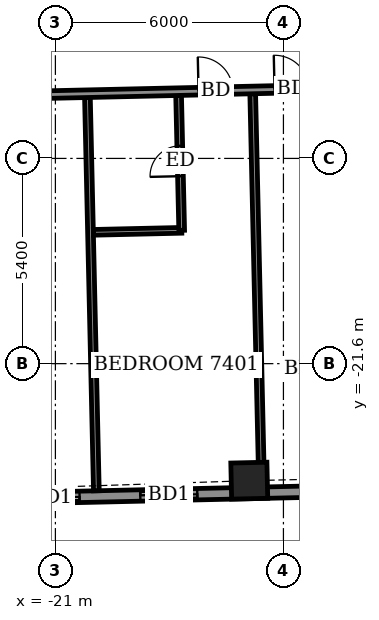
"""IFC4 building model, lengths in metres.
Left out: names, types, materials, properties, quantities, classifications, styles, units other than length and angle.
Written with IfcOpenShell. Run it as: python <this file> out.ifc"""

import sys

from ifc_helpers import new_model, si_unit, direction, frame, frame_2d, origin, origin_2d, place, context, subcontext, project, spatial, rectangle, extrude, element, fill, save


model = new_model("IFC4")
c1 = context("Model", 3, precision=1e-05, world=origin(), true_north=direction((0.0, 1.0)))
c2 = subcontext(c1, "Body", "Model", "MODEL_VIEW")
j1 = project(units=[si_unit("LENGTHUNIT", "METRE"), si_unit("PLANEANGLEUNIT", "RADIAN")], contexts=[c1])
p1 = place(None, origin())
s1 = spatial("IfcSite", under=j1, at=p1, CompositionType="ELEMENT")
p2 = place(p1, origin())
s2 = spatial("IfcBuilding", under=s1, at=p2, CompositionType="ELEMENT")
p3 = place(p2, frame((0.0, 0.0, 290.7)))
s3 = spatial("IfcBuildingStorey", under=s2, at=p3, CompositionType="ELEMENT", Elevation=290.7)
p4 = place(p3, frame((-15.899, -24.679, -0.55), z_axis=(0.0, 0.0, 1.0), x_axis=(0.999742783124, 0.022679673549, 0.0)))
e1 = element("IfcColumn", 1, at=p4, inside=s3, PredefinedType="COLUMN", context=c2, shape_type="SweptSolid", body=[
    extrude(rectangle(XDim=0.95, YDim=0.95, at=origin_2d()), origin(), (0.0, 0.0, 1.0), 3.6),
])
p5 = place(p3, frame((-22.816, -25.161, 0.0), z_axis=(0.0, 0.0, 1.0), x_axis=(0.999742646411, 0.022685699159, 0.0)))
e2 = element("IfcWall", 2, at=p5, inside=s3, PredefinedType="SOLIDWALL", context=c2, shape_type="SweptSolid", body=[
    extrude(rectangle(XDim=49.236, YDim=0.3, at=frame_2d((24.618, 0.0))), origin(), (0.0, 0.0, 1.0), 2.5),
])
p6 = place(p5, frame((0.953, 0.0, 0.0)))
e3 = element("IfcOpeningElement", 3, at=p6, cuts=e2, PredefinedType="OPENING", context=c2, shape_type="SweptSolid", body=[
    extrude(rectangle(XDim=1.5, YDim=2.4, at=frame_2d((0.75, 1.2))), frame((0.0, 0.16, 0.0), z_axis=(0.0, -1.0, 0.0), x_axis=(1.0, 0.0, 0.0)), (0.0, 0.0, 1.0), 0.32),
])
p7 = place(p5, frame((4.051, 0.0, 0.0)))
e4 = element("IfcOpeningElement", 4, at=p7, cuts=e2, PredefinedType="OPENING", context=c2, shape_type="SweptSolid", body=[
    extrude(rectangle(XDim=1.5, YDim=2.4, at=frame_2d((0.75, 1.2))), frame((0.0, 0.16, 0.0), z_axis=(0.0, -1.0, 0.0), x_axis=(1.0, 0.0, 0.0)), (0.0, 0.0, 1.0), 0.32),
])
p8 = place(p5, frame((8.725, 0.0, 0.0)))
e5 = element("IfcOpeningElement", 5, at=p8, cuts=e2, PredefinedType="OPENING", context=c2, shape_type="SweptSolid", body=[
    extrude(rectangle(XDim=1.5, YDim=2.4, at=frame_2d((0.75, 1.2))), frame((0.0, 0.16, 0.0), z_axis=(0.0, -1.0, 0.0), x_axis=(1.0, 0.0, 0.0)), (0.0, 0.0, 1.0), 0.32),
])
p9 = place(p5, frame((12.139, 0.0, 0.0)))
e6 = element("IfcOpeningElement", 6, at=p9, cuts=e2, PredefinedType="OPENING", context=c2, shape_type="SweptSolid", body=[
    extrude(rectangle(XDim=1.2, YDim=2.4, at=frame_2d((0.6, 1.2))), frame((0.0, 0.16, 0.0), z_axis=(0.0, -1.0, 0.0), x_axis=(1.0, 0.0, 0.0)), (0.0, 0.0, 1.0), 0.32),
])
p10 = place(p5, frame((17.6, 0.0, 0.0)))
e7 = element("IfcOpeningElement", 7, at=p10, cuts=e2, PredefinedType="OPENING", context=c2, shape_type="SweptSolid", body=[
    extrude(rectangle(XDim=1.5, YDim=2.4, at=frame_2d((0.75, 1.2))), frame((0.0, 0.16, 0.0), z_axis=(0.0, -1.0, 0.0), x_axis=(1.0, 0.0, 0.0)), (0.0, 0.0, 1.0), 0.32),
])
p11 = place(p5, frame((22.453, 0.0, 0.0)))
e8 = element("IfcOpeningElement", 8, at=p11, cuts=e2, PredefinedType="OPENING", context=c2, shape_type="SweptSolid", body=[
    extrude(rectangle(XDim=1.5, YDim=2.4, at=frame_2d((0.75, 1.2))), frame((0.0, 0.16, 0.0), z_axis=(0.0, -1.0, 0.0), x_axis=(1.0, 0.0, 0.0)), (0.0, 0.0, 1.0), 0.32),
])
p12 = place(p5, frame((25.765, 0.0, 0.0)))
e9 = element("IfcOpeningElement", 9, at=p12, cuts=e2, PredefinedType="OPENING", context=c2, shape_type="SweptSolid", body=[
    extrude(rectangle(XDim=1.5, YDim=2.4, at=frame_2d((0.75, 1.2))), frame((0.0, 0.16, 0.0), z_axis=(0.0, -1.0, 0.0), x_axis=(1.0, 0.0, 0.0)), (0.0, 0.0, 1.0), 0.32),
])
p13 = place(p5, frame((31.25, 0.0, 0.0)))
e10 = element("IfcOpeningElement", 10, at=p13, cuts=e2, PredefinedType="OPENING", context=c2, shape_type="SweptSolid", body=[
    extrude(rectangle(XDim=1.5, YDim=2.4, at=frame_2d((0.75, 1.2))), frame((0.0, 0.16, 0.0), z_axis=(0.0, -1.0, 0.0), x_axis=(1.0, 0.0, 0.0)), (0.0, 0.0, 1.0), 0.32),
])
p14 = place(p5, frame((36.429, 0.0, 0.0)))
e11 = element("IfcOpeningElement", 11, at=p14, cuts=e2, PredefinedType="OPENING", context=c2, shape_type="SweptSolid", body=[
    extrude(rectangle(XDim=1.5, YDim=2.4, at=frame_2d((0.75, 1.2))), frame((0.0, 0.16, 0.0), z_axis=(0.0, -1.0, 0.0), x_axis=(1.0, 0.0, 0.0)), (0.0, 0.0, 1.0), 0.32),
])
p15 = place(p5, frame((39.742, 0.0, 0.0)))
e12 = element("IfcOpeningElement", 12, at=p15, cuts=e2, PredefinedType="OPENING", context=c2, shape_type="SweptSolid", body=[
    extrude(rectangle(XDim=1.5, YDim=2.4, at=frame_2d((0.75, 1.2))), frame((0.0, 0.16, 0.0), z_axis=(0.0, -1.0, 0.0), x_axis=(1.0, 0.0, 0.0)), (0.0, 0.0, 1.0), 0.32),
])
p16 = place(p5, frame((44.72, 0.0, 0.9)))
e13 = element("IfcOpeningElement", 13, at=p16, cuts=e2, PredefinedType="OPENING", context=c2, shape_type="SweptSolid", body=[
    extrude(rectangle(XDim=2.4, YDim=1.5, at=frame_2d((1.2, 0.75))), frame((0.0, 0.16, 0.0), z_axis=(0.0, -1.0, 0.0), x_axis=(1.0, 0.0, 0.0)), (0.0, 0.0, 1.0), 0.32),
])
p17 = place(p3, frame((-19.922, -24.945, 0.0), z_axis=(0.0, 0.0, 1.0), x_axis=(-0.022692470342, 0.99974249274, 0.0)))
e14 = element("IfcWall", 14, at=p17, inside=s3, PredefinedType="PARTITIONING", context=c2, shape_type="SweptSolid", body=[
    extrude(rectangle(XDim=10.35, YDim=0.15, at=frame_2d((5.175, 0.0))), origin(), (0.0, 0.0, 1.0), 2.55),
])
p18 = place(p3, frame((-15.573, -24.847, 0.0), z_axis=(0.0, 0.0, 1.0), x_axis=(-0.022714440015, 0.999741993824, 0.0)))
e15 = element("IfcWall", 15, at=p18, inside=s3, PredefinedType="PARTITIONING", context=c2, shape_type="SweptSolid", body=[
    extrude(rectangle(XDim=10.351, YDim=0.15, at=frame_2d((5.175, 0.0))), origin(), (0.0, 0.0, 1.0), 3.05),
])
p19 = place(p3, frame((-19.999, -18.145, 0.0), z_axis=(0.0, 0.0, 1.0), x_axis=(0.999740260747, 0.02279059109, 0.0)))
e16 = element("IfcWall", 16, at=p19, inside=s3, PredefinedType="PARTITIONING", context=c2, shape_type="SweptSolid", body=[
    extrude(rectangle(XDim=2.324, YDim=0.15, at=frame_2d((1.162, 0.0))), origin(), (0.0, 0.0, 1.0), 3.05),
])
p20 = place(p3, frame((-17.677, -18.092, 0.0), z_axis=(0.0, 0.0, 1.0), x_axis=(-0.022832321005, 0.999739308579, 0.0)))
e17 = element("IfcWall", 17, at=p20, inside=s3, PredefinedType="PARTITIONING", context=c2, shape_type="SweptSolid", body=[
    extrude(rectangle(XDim=3.55, YDim=0.15, at=frame_2d((1.775, 0.0))), origin(), (0.0, 0.0, 1.0), 3.05),
])
p21 = place(p20, frame((1.425, 0.0, 0.0)))
e18 = element("IfcOpeningElement", 18, at=p21, cuts=e17, PredefinedType="OPENING", context=c2, shape_type="SweptSolid", body=[
    extrude(rectangle(XDim=0.8, YDim=2.1, at=frame_2d((0.4, 1.05))), frame((0.0, 0.085, 0.0), z_axis=(0.0, -1.0, 0.0), x_axis=(1.0, 0.0, 0.0)), (0.0, 0.0, 1.0), 0.17),
])
p22 = place(p3, frame((-25.731, -14.624, 0.0), z_axis=(0.0, 0.0, 1.0), x_axis=(0.999742799525, 0.022678950563, 0.0)))
e19 = element("IfcWall", 19, at=p22, inside=s3, PredefinedType="PARTITIONING", context=c2, shape_type="SweptSolid", body=[
    extrude(rectangle(XDim=55.386, YDim=0.2, at=frame_2d((27.693, 0.0))), origin(), (0.0, 0.0, 1.0), 3.05),
])
p23 = place(p22, frame((1.691, 0.0, 0.0)))
e20 = element("IfcOpeningElement", 20, at=p23, cuts=e19, PredefinedType="OPENING", context=c2, shape_type="SweptSolid", body=[
    extrude(rectangle(XDim=1.0, YDim=2.1, at=frame_2d((0.5, 1.05))), frame((0.0, 0.11, 0.0), z_axis=(0.0, -1.0, 0.0), x_axis=(1.0, 0.0, 0.0)), (0.0, 0.0, 1.0), 0.22),
])
p24 = place(p22, frame((8.5, 0.0, 0.0)))
e21 = element("IfcOpeningElement", 21, at=p24, cuts=e19, PredefinedType="OPENING", context=c2, shape_type="SweptSolid", body=[
    extrude(rectangle(XDim=0.9, YDim=2.1, at=frame_2d((0.45, 1.05))), frame((0.0, 0.11, 0.0), z_axis=(0.0, -1.0, 0.0), x_axis=(1.0, 0.0, 0.0)), (0.0, 0.0, 1.0), 0.22),
])
p25 = place(p22, frame((10.5, 0.0, 0.0)))
e22 = element("IfcOpeningElement", 22, at=p25, cuts=e19, PredefinedType="OPENING", context=c2, shape_type="SweptSolid", body=[
    extrude(rectangle(XDim=0.9, YDim=2.1, at=frame_2d((0.45, 1.05))), frame((0.0, 0.11, 0.0), z_axis=(0.0, -1.0, 0.0), x_axis=(1.0, 0.0, 0.0)), (0.0, 0.0, 1.0), 0.22),
])
p26 = place(p22, frame((17.325, 0.0, 0.0)))
e23 = element("IfcOpeningElement", 23, at=p26, cuts=e19, PredefinedType="OPENING", context=c2, shape_type="SweptSolid", body=[
    extrude(rectangle(XDim=0.9, YDim=2.1, at=frame_2d((0.45, 1.05))), frame((0.0, 0.11, 0.0), z_axis=(0.0, -1.0, 0.0), x_axis=(1.0, 0.0, 0.0)), (0.0, 0.0, 1.0), 0.22),
])
p27 = place(p22, frame((19.375, 0.0, 0.0)))
e24 = element("IfcOpeningElement", 24, at=p27, cuts=e19, PredefinedType="OPENING", context=c2, shape_type="SweptSolid", body=[
    extrude(rectangle(XDim=0.9, YDim=2.1, at=frame_2d((0.45, 1.05))), frame((0.0, 0.11, 0.0), z_axis=(0.0, -1.0, 0.0), x_axis=(1.0, 0.0, 0.0)), (0.0, 0.0, 1.0), 0.22),
])
p28 = place(p22, frame((26.275, 0.0, 0.0)))
e25 = element("IfcOpeningElement", 25, at=p28, cuts=e19, PredefinedType="OPENING", context=c2, shape_type="SweptSolid", body=[
    extrude(rectangle(XDim=0.9, YDim=2.1, at=frame_2d((0.45, 1.05))), frame((0.0, 0.11, 0.0), z_axis=(0.0, -1.0, 0.0), x_axis=(1.0, 0.0, 0.0)), (0.0, 0.0, 1.0), 0.22),
])
p29 = place(p22, frame((28.425, 0.0, 0.0)))
e26 = element("IfcOpeningElement", 26, at=p29, cuts=e19, PredefinedType="OPENING", context=c2, shape_type="SweptSolid", body=[
    extrude(rectangle(XDim=0.9, YDim=2.1, at=frame_2d((0.45, 1.05))), frame((0.0, 0.11, 0.0), z_axis=(0.0, -1.0, 0.0), x_axis=(1.0, 0.0, 0.0)), (0.0, 0.0, 1.0), 0.22),
])
p30 = place(p22, frame((35.425, 0.0, 0.0)))
e27 = element("IfcOpeningElement", 27, at=p30, cuts=e19, PredefinedType="OPENING", context=c2, shape_type="SweptSolid", body=[
    extrude(rectangle(XDim=0.9, YDim=2.1, at=frame_2d((0.45, 1.05))), frame((0.0, 0.11, 0.0), z_axis=(0.0, -1.0, 0.0), x_axis=(1.0, 0.0, 0.0)), (0.0, 0.0, 1.0), 0.22),
])
p31 = place(p22, frame((37.625, 0.0, 0.0)))
e28 = element("IfcOpeningElement", 28, at=p31, cuts=e19, PredefinedType="OPENING", context=c2, shape_type="SweptSolid", body=[
    extrude(rectangle(XDim=0.9, YDim=2.1, at=frame_2d((0.45, 1.05))), frame((0.0, 0.11, 0.0), z_axis=(0.0, -1.0, 0.0), x_axis=(1.0, 0.0, 0.0)), (0.0, 0.0, 1.0), 0.22),
])
p32 = place(p22, frame((44.475, 0.0, 0.0)))
e29 = element("IfcOpeningElement", 29, at=p32, cuts=e19, PredefinedType="OPENING", context=c2, shape_type="SweptSolid", body=[
    extrude(rectangle(XDim=0.9, YDim=2.1, at=frame_2d((0.45, 1.05))), frame((0.0, 0.11, 0.0), z_axis=(0.0, -1.0, 0.0), x_axis=(1.0, 0.0, 0.0)), (0.0, 0.0, 1.0), 0.22),
])
p33 = place(p22, frame((52.268, 0.0, 0.0)))
e30 = element("IfcOpeningElement", 30, at=p33, cuts=e19, PredefinedType="OPENING", context=c2, shape_type="SweptSolid", body=[
    extrude(rectangle(XDim=1.0, YDim=2.1, at=frame_2d((0.5, 1.05))), frame((0.0, 0.11, 0.0), z_axis=(0.0, -1.0, 0.0), x_axis=(1.0, 0.0, 0.0)), (0.0, 0.0, 1.0), 0.22),
])
p34 = place(p22, frame((46.625, 0.0, 0.0)))
e31 = element("IfcOpeningElement", 31, at=p34, cuts=e19, PredefinedType="OPENING", context=c2, shape_type="SweptSolid", body=[
    extrude(rectangle(XDim=0.9, YDim=2.1, at=frame_2d((0.45, 1.05))), frame((0.0, 0.11, 0.0), z_axis=(0.0, -1.0, 0.0), x_axis=(1.0, 0.0, 0.0)), (0.0, 0.0, 1.0), 0.22),
])
p35 = place(p6, origin())
e32 = element("IfcDoor", 32, at=p35, inside=s3, OperationType="SLIDING_TO_LEFT", PredefinedType="DOOR", context=c2, shape_type="SweptSolid", body=[
    extrude(rectangle(XDim=1.5, YDim=2.4, at=frame_2d((0.75, 1.2))), frame((0.0, 0.025, 0.0), z_axis=(0.0, -1.0, 0.0), x_axis=(1.0, 0.0, 0.0)), (0.0, 0.0, 1.0), 0.05),
])
fill(e3, e32)
p36 = place(p7, origin())
e33 = element("IfcDoor", 33, at=p36, inside=s3, OperationType="SLIDING_TO_LEFT", PredefinedType="DOOR", context=c2, shape_type="SweptSolid", body=[
    extrude(rectangle(XDim=1.5, YDim=2.4, at=frame_2d((0.75, 1.2))), frame((0.0, 0.025, 0.0), z_axis=(0.0, -1.0, 0.0), x_axis=(1.0, 0.0, 0.0)), (0.0, 0.0, 1.0), 0.05),
])
fill(e4, e33)
p37 = place(p24, origin())
e34 = element("IfcDoor", 34, at=p37, inside=s3, OperationType="SINGLE_SWING_LEFT", PredefinedType="DOOR", context=c2, shape_type="SweptSolid", body=[
    extrude(rectangle(XDim=0.9, YDim=2.1, at=frame_2d((0.45, 1.05))), frame((0.0, 0.025, 0.0), z_axis=(0.0, -1.0, 0.0), x_axis=(1.0, 0.0, 0.0)), (0.0, 0.0, 1.0), 0.05),
])
fill(e21, e34)
p38 = place(p21, origin())
e35 = element("IfcDoor", 35, at=p38, inside=s3, OperationType="SINGLE_SWING_LEFT", PredefinedType="DOOR", context=c2, shape_type="SweptSolid", body=[
    extrude(rectangle(XDim=0.8, YDim=2.1, at=frame_2d((0.4, 1.05))), frame((0.0, 0.025, 0.0), z_axis=(0.0, -1.0, 0.0), x_axis=(1.0, 0.0, 0.0)), (0.0, 0.0, 1.0), 0.05),
])
fill(e18, e35)
p39 = place(p25, origin())
e36 = element("IfcDoor", 36, at=p39, inside=s3, OperationType="SINGLE_SWING_RIGHT", PredefinedType="DOOR", context=c2, shape_type="SweptSolid", body=[
    extrude(rectangle(XDim=0.9, YDim=2.1, at=frame_2d((0.45, 1.05))), frame((0.0, 0.025, 0.0), z_axis=(0.0, -1.0, 0.0), x_axis=(1.0, 0.0, 0.0)), (0.0, 0.0, 1.0), 0.05),
])
fill(e22, e36)
save(model, sys.argv[1])
